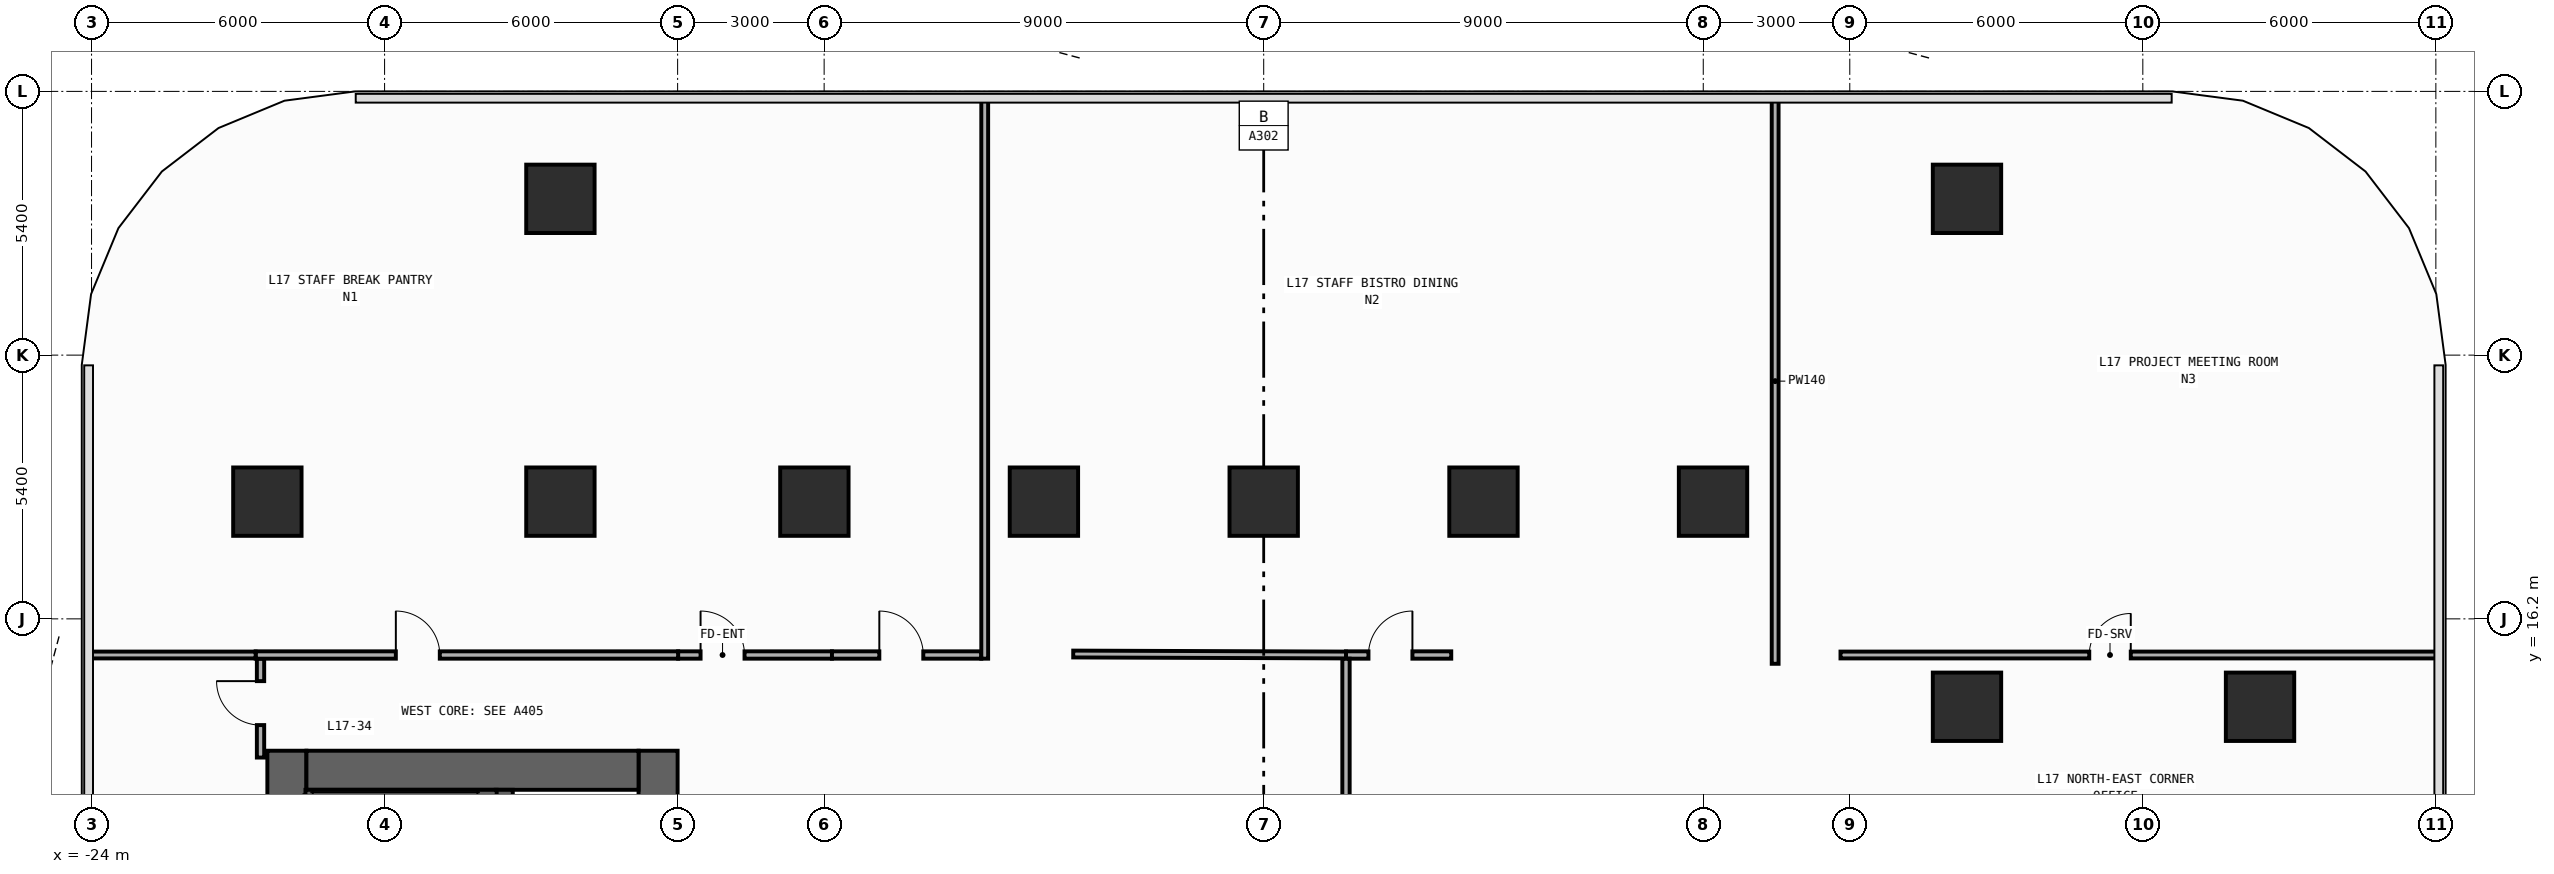
"""IFC4 building model, lengths in metres.
Left out: names, types, materials, properties, quantities, classifications, styles, units other than length and angle.
Written with IfcOpenShell. Run it as: python <this file> out.ifc"""

import sys

from ifc_helpers import new_model, si_unit, direction, frame, frame_2d, origin, origin_2d, place, context, subcontext, project, spatial, rectangle, extrude, element, fill, save


model = new_model("IFC4")
c1 = context("Model", 3, precision=1e-05, world=origin(), true_north=direction((0.0, 1.0)))
c2 = subcontext(c1, "Body", "Model", "MODEL_VIEW")
j1 = project(units=[si_unit("LENGTHUNIT", "METRE"), si_unit("PLANEANGLEUNIT", "RADIAN")], contexts=[c1])
p1 = place(None, origin())
s1 = spatial("IfcSite", under=j1, at=p1, CompositionType="ELEMENT")
p2 = place(p1, origin())
s2 = spatial("IfcBuilding", under=s1, at=p2, CompositionType="ELEMENT")
p3 = place(p2, frame((0.0, 0.0, 72.2)))
s3 = spatial("IfcBuildingStorey", under=s2, at=p3, CompositionType="ELEMENT", Elevation=72.2)
p4 = place(p3, frame((-20.0, -13.5, 0.0), z_axis=(0.0, 0.0, 1.0), x_axis=(0.0, 1.0, 0.0)))
e1 = element("IfcWall", 1, at=p4, inside=s3, PredefinedType="SHEAR", context=c2, shape_type="SweptSolid", body=[
    extrude(rectangle(XDim=27.0, YDim=0.8, at=frame_2d((13.5, 0.0))), origin(), (0.0, 0.0, 1.0), 3.94),
])
p5 = place(p3, frame((-12.4, -13.5, 0.0), z_axis=(0.0, 0.0, 1.0), x_axis=(0.0, 1.0, 0.0)))
e2 = element("IfcWall", 2, at=p5, inside=s3, PredefinedType="SHEAR", context=c2, shape_type="SweptSolid", body=[
    extrude(rectangle(XDim=27.0, YDim=0.8, at=frame_2d((13.5, 0.0))), origin(), (0.0, 0.0, 1.0), 3.94),
])
p6 = place(p5, frame((21.55, 0.0, 0.0)))
e3 = element("IfcOpeningElement", 3, at=p6, cuts=e2, PredefinedType="OPENING", context=c2, shape_type="SweptSolid", body=[
    extrude(rectangle(XDim=1.1, YDim=2.2, at=frame_2d((0.55, 1.1))), frame((0.0, 0.41, 0.0), z_axis=(0.0, -1.0, 0.0), x_axis=(1.0, 0.0, 0.0)), (0.0, 0.0, 1.0), 0.82),
])
p7 = place(p5, frame((18.35, 0.0, 0.0)))
e4 = element("IfcOpeningElement", 4, at=p7, cuts=e2, PredefinedType="OPENING", context=c2, shape_type="SweptSolid", body=[
    extrude(rectangle(XDim=1.1, YDim=2.2, at=frame_2d((0.55, 1.1))), frame((0.0, 0.41, 0.0), z_axis=(0.0, -1.0, 0.0), x_axis=(1.0, 0.0, 0.0)), (0.0, 0.0, 1.0), 0.82),
])
p8 = place(p5, frame((15.15, 0.0, 0.0)))
e5 = element("IfcOpeningElement", 5, at=p8, cuts=e2, PredefinedType="OPENING", context=c2, shape_type="SweptSolid", body=[
    extrude(rectangle(XDim=1.1, YDim=2.2, at=frame_2d((0.55, 1.1))), frame((0.0, 0.41, 0.0), z_axis=(0.0, -1.0, 0.0), x_axis=(1.0, 0.0, 0.0)), (0.0, 0.0, 1.0), 0.82),
])
p9 = place(p5, frame((10.35, 0.0, 0.0)))
e6 = element("IfcOpeningElement", 6, at=p9, cuts=e2, PredefinedType="OPENING", context=c2, shape_type="SweptSolid", body=[
    extrude(rectangle(XDim=1.1, YDim=2.2, at=frame_2d((0.55, 1.1))), frame((0.0, 0.41, 0.0), z_axis=(0.0, -1.0, 0.0), x_axis=(1.0, 0.0, 0.0)), (0.0, 0.0, 1.0), 0.82),
])
p10 = place(p5, frame((7.15, 0.0, 0.0)))
e7 = element("IfcOpeningElement", 7, at=p10, cuts=e2, PredefinedType="OPENING", context=c2, shape_type="SweptSolid", body=[
    extrude(rectangle(XDim=1.1, YDim=2.2, at=frame_2d((0.55, 1.1))), frame((0.0, 0.41, 0.0), z_axis=(0.0, -1.0, 0.0), x_axis=(1.0, 0.0, 0.0)), (0.0, 0.0, 1.0), 0.82),
])
p11 = place(p5, frame((3.95, 0.0, 0.0)))
e8 = element("IfcOpeningElement", 8, at=p11, cuts=e2, PredefinedType="OPENING", context=c2, shape_type="SweptSolid", body=[
    extrude(rectangle(XDim=1.1, YDim=2.2, at=frame_2d((0.55, 1.1))), frame((0.0, 0.41, 0.0), z_axis=(0.0, -1.0, 0.0), x_axis=(1.0, 0.0, 0.0)), (0.0, 0.0, 1.0), 0.82),
])
p12 = place(p5, frame((12.725, 0.0, 0.0)))
e9 = element("IfcOpeningElement", 9, at=p12, cuts=e2, PredefinedType="OPENING", context=c2, shape_type="SweptSolid", body=[
    extrude(rectangle(XDim=1.15, YDim=2.2, at=frame_2d((0.575, 1.1))), frame((0.0, 0.41, 0.0), z_axis=(0.0, -1.0, 0.0), x_axis=(1.0, 0.0, 0.0)), (0.0, 0.0, 1.0), 0.82),
])
p13 = place(p5, frame((1.625, 0.0, 0.0)))
e10 = element("IfcOpeningElement", 10, at=p13, cuts=e2, PredefinedType="OPENING", context=c2, shape_type="SweptSolid", body=[
    extrude(rectangle(XDim=0.85, YDim=2.1, at=frame_2d((0.425, 1.05))), frame((0.0, 0.41, 0.0), z_axis=(0.0, -1.0, 0.0), x_axis=(1.0, 0.0, 0.0)), (0.0, 0.0, 1.0), 0.82),
])
p14 = place(p3, frame((-19.6, 13.1, 0.0), z_axis=(0.0, 0.0, 1.0), x_axis=(1.0, 0.0, 0.0)))
e11 = element("IfcWall", 11, at=p14, inside=s3, PredefinedType="SHEAR", context=c2, shape_type="SweptSolid", body=[
    extrude(rectangle(XDim=6.8, YDim=0.8, at=frame_2d((3.4, 0.0))), origin(), (0.0, 0.0, 1.0), 3.94),
])
p15 = place(p3, frame((-15.55, -12.7, 0.0), z_axis=(0.0, 0.0, 1.0), x_axis=(0.0, 1.0, 0.0)))
e12 = element("IfcWall", 12, at=p15, inside=s3, PredefinedType="SHEAR", context=c2, shape_type="SweptSolid", body=[
    extrude(rectangle(XDim=25.4, YDim=0.35, at=frame_2d((12.7, 0.0))), origin(), (0.0, 0.0, 1.0), 3.94),
])
p16 = place(p15, frame((11.925, 0.0, 0.0)))
e13 = element("IfcOpeningElement", 13, at=p16, cuts=e12, PredefinedType="OPENING", context=c2, shape_type="SweptSolid", body=[
    extrude(rectangle(XDim=1.15, YDim=2.2, at=frame_2d((0.575, 1.1))), frame((0.0, 0.185, 0.0), z_axis=(0.0, -1.0, 0.0), x_axis=(1.0, 0.0, 0.0)), (0.0, 0.0, 1.0), 0.37),
])
p17 = place(p15, frame((0.825, 0.0, 0.0)))
e14 = element("IfcOpeningElement", 14, at=p17, cuts=e12, PredefinedType="OPENING", context=c2, shape_type="SweptSolid", body=[
    extrude(rectangle(XDim=0.85, YDim=2.1, at=frame_2d((0.425, 1.05))), frame((0.0, 0.185, 0.0), z_axis=(0.0, -1.0, 0.0), x_axis=(1.0, 0.0, 0.0)), (0.0, 0.0, 1.0), 0.37),
])
p18 = place(p3, frame((-19.62, 12.59, 0.0), z_axis=(0.0, 0.0, 1.0), x_axis=(1.0, 0.0, 0.0)))
e15 = element("IfcWall", 15, at=p18, inside=s3, PredefinedType="SHEAR", context=c2, shape_type="SweptSolid", body=[
    extrude(rectangle(XDim=3.915, YDim=0.22, at=frame_2d((1.958, 0.0))), origin(), (0.0, 0.0, 1.0), 3.94),
])
for number, where, z_axis, x_axis in (
    (16, (-9.2, 18.6, 0.0), (0.0, 0.0, 1.0), (1.0, 0.0, 0.0)),
    (17, (9.2, 18.6, 0.0), (0.0, 0.0, 1.0), (1.0, 0.0, 0.0)),
    (18, (-20.4, 18.6, 0.0), (0.0, 0.0, 1.0), (1.0, 0.0, 0.0)),
    (19, (20.4, 14.4, 0.0), (0.0, 0.0, 1.0), (1.0, 0.0, 0.0)),
    (20, (-14.4, 18.6, 0.0), (0.0, 0.0, 1.0), (1.0, 0.0, 0.0)),
    (21, (14.4, 14.4, 0.0), (0.0, 0.0, 1.0), (1.0, 0.0, 0.0)),
    (22, (-4.5, 18.6, 0.0), (0.0, 0.0, 1.0), (1.0, 0.0, 0.0)),
    (23, (0.0, 18.6, 0.0), (0.0, 0.0, 1.0), (1.0, 0.0, 0.0)),
    (24, (4.5, 18.6, 0.0), (0.0, 0.0, 1.0), (1.0, 0.0, 0.0)),
    (25, (-14.4, 24.8, 0.0), (0.0, 0.0, 1.0), (1.0, 0.0, 0.0)),
    (26, (14.4, 24.8, 0.0), (0.0, 0.0, 1.0), (1.0, 0.0, 0.0)),
):
    element("IfcColumn", number, at=place(p3, frame(where, z_axis=z_axis, x_axis=x_axis)), inside=s3, PredefinedType="COLUMN", context=c2, shape_type="SweptSolid", body=[
        extrude(rectangle(XDim=1.4, YDim=1.4, at=origin_2d()), origin(), (0.0, 0.0, 1.0), 4.2),
    ])
p19 = place(p3, frame((-11.99, 15.46, 0.0), z_axis=(0.0, 0.0, 1.0), x_axis=(1.0, 0.0, 0.0)))
e27 = element("IfcWall", 27, at=p19, inside=s3, PredefinedType="PARTITIONING", context=c2, shape_type="SweptSolid", body=[
    extrude(rectangle(XDim=3.15, YDim=0.15, at=frame_2d((1.575, 0.0))), origin(), (0.0, 0.0, 1.0), 3.94),
])
p20 = place(p19, frame((0.46, 0.0, 0.0)))
e28 = element("IfcOpeningElement", 28, at=p20, cuts=e27, PredefinedType="OPENING", context=c2, shape_type="SweptSolid", body=[
    extrude(rectangle(XDim=0.9, YDim=2.15, at=frame_2d((0.45, 1.075))), frame((0.0, 0.085, 0.0), z_axis=(0.0, -1.0, 0.0), x_axis=(1.0, 0.0, 0.0)), (0.0, 0.0, 1.0), 0.17),
])
p21 = place(p3, frame((-8.84, 15.46, 0.0), z_axis=(0.0, 0.0, 1.0), x_axis=(1.0, 0.0, 0.0)))
e29 = element("IfcWall", 29, at=p21, inside=s3, PredefinedType="PARTITIONING", context=c2, shape_type="SweptSolid", body=[
    extrude(rectangle(XDim=3.058, YDim=0.15, at=frame_2d((1.529, 0.0))), origin(), (0.0, 0.0, 1.0), 3.94),
])
p22 = place(p21, frame((0.97, 0.0, 0.0)))
e30 = element("IfcOpeningElement", 30, at=p22, cuts=e29, PredefinedType="OPENING", context=c2, shape_type="SweptSolid", body=[
    extrude(rectangle(XDim=0.9, YDim=2.15, at=frame_2d((0.45, 1.075))), frame((0.0, 0.085, 0.0), z_axis=(0.0, -1.0, 0.0), x_axis=(1.0, 0.0, 0.0)), (0.0, 0.0, 1.0), 0.17),
])
p23 = place(p3, frame((1.685, 15.46, 0.0), z_axis=(0.0, 0.0, 1.0), x_axis=(1.0, 0.0, 0.0)))
e31 = element("IfcWall", 31, at=p23, inside=s3, PredefinedType="PARTITIONING", context=c2, shape_type="SweptSolid", body=[
    extrude(rectangle(XDim=2.155, YDim=0.15, at=frame_2d((1.078, 0.0))), origin(), (0.0, 0.0, 1.0), 3.94),
])
p24 = place(p23, frame((0.46, 0.0, 0.0)))
e32 = element("IfcOpeningElement", 32, at=p24, cuts=e31, PredefinedType="OPENING", context=c2, shape_type="SweptSolid", body=[
    extrude(rectangle(XDim=0.9, YDim=2.15, at=frame_2d((0.45, 1.075))), frame((0.0, 0.085, 0.0), z_axis=(0.0, -1.0, 0.0), x_axis=(1.0, 0.0, 0.0)), (0.0, 0.0, 1.0), 0.17),
])
p25 = place(p3, frame((1.685, -4.62, 0.0), z_axis=(0.0, 0.0, 1.0), x_axis=(0.0, 1.0, 0.0)))
e33 = element("IfcWall", 33, at=p25, inside=s3, PredefinedType="PARTITIONING", context=c2, shape_type="SweptSolid", body=[
    extrude(rectangle(XDim=20.005, YDim=0.15, at=frame_2d((10.002, 0.0))), origin(), (0.0, 0.0, 1.0), 3.94),
])
p26 = place(p25, frame((9.552, 0.0, 0.0)))
e34 = element("IfcOpeningElement", 34, at=p26, cuts=e33, PredefinedType="OPENING", context=c2, shape_type="SweptSolid", body=[
    extrude(rectangle(XDim=0.9, YDim=2.15, at=frame_2d((0.45, 1.075))), frame((0.0, 0.085, 0.0), z_axis=(0.0, -1.0, 0.0), x_axis=(1.0, 0.0, 0.0)), (0.0, 0.0, 1.0), 0.17),
])
p27 = place(p3, frame((-20.54, 13.36, 0.0), z_axis=(0.0, 0.0, 1.0), x_axis=(0.0, 1.0, 0.0)))
e35 = element("IfcWall", 35, at=p27, inside=s3, PredefinedType="PARTITIONING", context=c2, shape_type="SweptSolid", body=[
    extrude(rectangle(XDim=2.025, YDim=0.15, at=frame_2d((1.012, 0.0))), origin(), (0.0, 0.0, 1.0), 3.94),
])
p28 = place(p27, frame((0.665, 0.0, 0.0)))
e36 = element("IfcOpeningElement", 36, at=p28, cuts=e35, PredefinedType="OPENING", context=c2, shape_type="SweptSolid", body=[
    extrude(rectangle(XDim=0.9, YDim=2.15, at=frame_2d((0.45, 1.075))), frame((0.0, 0.085, 0.0), z_axis=(0.0, -1.0, 0.0), x_axis=(1.0, 0.0, 0.0)), (0.0, 0.0, 1.0), 0.17),
])
p29 = place(p3, frame((-20.64, 15.46, 0.0), z_axis=(0.0, 0.0, 1.0), x_axis=(1.0, 0.0, 0.0)))
e37 = element("IfcWall", 37, at=p29, inside=s3, PredefinedType="PARTITIONING", context=c2, shape_type="SweptSolid", body=[
    extrude(rectangle(XDim=8.65, YDim=0.15, at=frame_2d((4.325, 0.0))), origin(), (0.0, 0.0, 1.0), 3.94),
])
p30 = place(p29, frame((2.871, 0.0, 0.0)))
e38 = element("IfcOpeningElement", 38, at=p30, cuts=e37, PredefinedType="OPENING", context=c2, shape_type="SweptSolid", body=[
    extrude(rectangle(XDim=0.9, YDim=2.15, at=frame_2d((0.45, 1.075))), frame((0.0, 0.085, 0.0), z_axis=(0.0, -1.0, 0.0), x_axis=(1.0, 0.0, 0.0)), (0.0, 0.0, 1.0), 0.17),
])
p31 = place(p3, frame((-24.055, 15.46, 0.0), z_axis=(0.0, 0.0, 1.0), x_axis=(1.0, 0.0, 0.0)))
e39 = element("IfcWall", 39, at=p31, inside=s3, PredefinedType="PARTITIONING", context=c2, shape_type="SweptSolid", body=[
    extrude(rectangle(XDim=3.415, YDim=0.14, at=frame_2d((1.708, 0.0))), origin(), (0.0, 0.0, 1.0), 3.94),
])
p32 = place(p3, frame((11.81, 15.46, 0.0), z_axis=(0.0, 0.0, 1.0), x_axis=(1.0, 0.0, 0.0)))
e40 = element("IfcWall", 40, at=p32, inside=s3, PredefinedType="PARTITIONING", context=c2, shape_type="SweptSolid", body=[
    extrude(rectangle(XDim=12.245, YDim=0.14, at=frame_2d((6.123, 0.0))), origin(), (0.0, 0.0, 1.0), 3.94),
])
p33 = place(p32, frame((5.093, 0.0, 0.0)))
e41 = element("IfcOpeningElement", 41, at=p33, cuts=e40, PredefinedType="OPENING", context=c2, shape_type="SweptSolid", body=[
    extrude(rectangle(XDim=0.85, YDim=2.1, at=frame_2d((0.425, 1.05))), frame((0.0, 0.08, 0.0), z_axis=(0.0, -1.0, 0.0), x_axis=(1.0, 0.0, 0.0)), (0.0, 0.0, 1.0), 0.16),
])
p34 = place(p3, frame((-5.712, 15.385, 0.0), z_axis=(0.0, 0.0, 1.0), x_axis=(0.0, 1.0, 0.0)))
e42 = element("IfcWall", 42, at=p34, inside=s3, PredefinedType="PARTITIONING", context=c2, shape_type="SweptSolid", body=[
    extrude(rectangle(XDim=11.47, YDim=0.14, at=frame_2d((5.735, 0.0))), origin(), (0.0, 0.0, 1.0), 3.94),
])
p35 = place(p3, frame((10.472, 15.28, 0.0), z_axis=(0.0, 0.0, 1.0), x_axis=(0.0, 1.0, 0.0)))
e43 = element("IfcWall", 43, at=p35, inside=s3, PredefinedType="PARTITIONING", context=c2, shape_type="SweptSolid", body=[
    extrude(rectangle(XDim=11.575, YDim=0.14, at=frame_2d((5.788, 0.0))), origin(), (0.0, 0.0, 1.0), 3.94),
])
p36 = place(p3, frame((-3.9, 15.48, 0.0), z_axis=(0.0, 0.0, 1.0), x_axis=(0.999993575589, -0.003584519724, 0.0)))
e44 = element("IfcWall", 44, at=p36, inside=s3, PredefinedType="PARTITIONING", context=c2, shape_type="SweptSolid", body=[
    extrude(rectangle(XDim=5.585, YDim=0.14, at=frame_2d((2.792, 0.0))), origin(), (0.0, 0.0, 1.0), 3.94),
])
p37 = place(p20, origin())
e45 = element("IfcDoor", 45, at=p37, inside=s3, OperationType="SINGLE_SWING_LEFT", PredefinedType="DOOR", context=c2, shape_type="SweptSolid", body=[
    extrude(rectangle(XDim=0.9, YDim=2.15, at=frame_2d((0.45, 1.075))), frame((0.0, 0.025, 0.0), z_axis=(0.0, -1.0, 0.0), x_axis=(1.0, 0.0, 0.0)), (0.0, 0.0, 1.0), 0.05),
])
fill(e28, e45)
p38 = place(p22, origin())
e46 = element("IfcDoor", 46, at=p38, inside=s3, OperationType="SINGLE_SWING_LEFT", PredefinedType="DOOR", context=c2, shape_type="SweptSolid", body=[
    extrude(rectangle(XDim=0.9, YDim=2.15, at=frame_2d((0.45, 1.075))), frame((0.0, 0.025, 0.0), z_axis=(0.0, -1.0, 0.0), x_axis=(1.0, 0.0, 0.0)), (0.0, 0.0, 1.0), 0.05),
])
fill(e30, e46)
p39 = place(p24, origin())
e47 = element("IfcDoor", 47, at=p39, inside=s3, OperationType="SINGLE_SWING_RIGHT", PredefinedType="DOOR", context=c2, shape_type="SweptSolid", body=[
    extrude(rectangle(XDim=0.9, YDim=2.15, at=frame_2d((0.45, 1.075))), frame((0.0, 0.025, 0.0), z_axis=(0.0, -1.0, 0.0), x_axis=(1.0, 0.0, 0.0)), (0.0, 0.0, 1.0), 0.05),
])
fill(e32, e47)
p40 = place(p28, origin())
e48 = element("IfcDoor", 48, at=p40, inside=s3, OperationType="SINGLE_SWING_RIGHT", PredefinedType="DOOR", context=c2, shape_type="SweptSolid", body=[
    extrude(rectangle(XDim=0.9, YDim=2.15, at=frame_2d((0.45, 1.075))), frame((0.0, 0.025, 0.0), z_axis=(0.0, -1.0, 0.0), x_axis=(1.0, 0.0, 0.0)), (0.0, 0.0, 1.0), 0.05),
])
fill(e36, e48)
p41 = place(p30, origin())
e49 = element("IfcDoor", 49, at=p41, inside=s3, OperationType="SINGLE_SWING_LEFT", PredefinedType="DOOR", context=c2, shape_type="SweptSolid", body=[
    extrude(rectangle(XDim=0.9, YDim=2.15, at=frame_2d((0.45, 1.075))), frame((0.0, 0.025, 0.0), z_axis=(0.0, -1.0, 0.0), x_axis=(1.0, 0.0, 0.0)), (0.0, 0.0, 1.0), 0.05),
])
fill(e38, e49)
p42 = place(p33, origin())
e50 = element("IfcDoor", 50, at=p42, inside=s3, OperationType="SINGLE_SWING_RIGHT", PredefinedType="DOOR", context=c2, shape_type="SweptSolid", body=[
    extrude(rectangle(XDim=0.85, YDim=2.1, at=frame_2d((0.425, 1.05))), frame((0.0, 0.025, 0.0), z_axis=(0.0, -1.0, 0.0), x_axis=(1.0, 0.0, 0.0)), (0.0, 0.0, 1.0), 0.05),
])
fill(e41, e50)
save(model, sys.argv[1])
